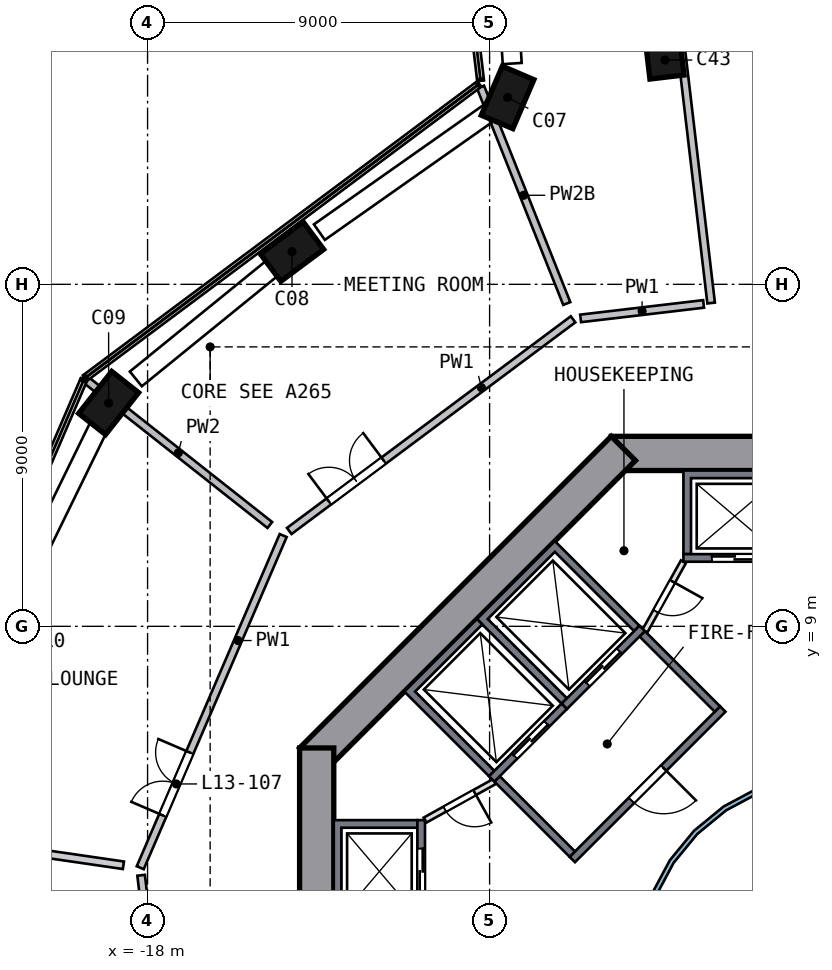
"""IFC4 building model, lengths in metres.
Left out: names, types, materials, properties, quantities, classifications, styles, units other than length and angle.
Written with IfcOpenShell. Run it as: python <this file> out.ifc"""

import sys

from ifc_helpers import new_model, si_unit, direction, frame, frame_2d, origin, origin_2d, place, context, subcontext, project, spatial, polyline, rectangle, outline, extrude, element, fill, save


model = new_model("IFC4")
c1 = context("Model", 3, precision=1e-05, world=origin(), true_north=direction((0.0, 1.0)))
c2 = subcontext(c1, "Body", "Model", "MODEL_VIEW")
j1 = project(units=[si_unit("LENGTHUNIT", "METRE"), si_unit("PLANEANGLEUNIT", "RADIAN")], contexts=[c1])
p1 = place(None, origin())
s1 = spatial("IfcSite", under=j1, at=p1, CompositionType="ELEMENT")
p2 = place(p1, origin())
s2 = spatial("IfcBuilding", under=s1, at=p2, CompositionType="ELEMENT")
p3 = place(p2, frame((0.0, 0.0, 60.0)))
s3 = spatial("IfcBuildingStorey", under=s2, at=p3, CompositionType="ELEMENT", Elevation=60.0)
p4 = place(p3, frame((-8.424, 22.957, 0.0), z_axis=(-0.084837531, -0.031915624, 0.99588352), x_axis=(0.390902536, 0.918292025, 0.062729293)))
e1 = element("IfcColumn", 1, at=p4, inside=s3, PredefinedType="COLUMN", context=c2, shape_type="SweptSolid", body=[
    extrude(rectangle(XDim=1.4, YDim=0.9, at=origin_2d()), origin(), (0.0, 0.0, 1.0), 4.207),
])
p5 = place(p3, frame((-14.115, 18.924, 0.0), z_axis=(-0.069769341, -0.052936472, 0.996157602), x_axis=(-0.798641913, -0.595400375, -0.087575616)))
e2 = element("IfcColumn", 2, at=p5, inside=s3, PredefinedType="COLUMN", context=c2, shape_type="SweptSolid", body=[
    extrude(rectangle(XDim=1.4, YDim=0.9, at=origin_2d()), origin(), (0.0, 0.0, 1.0), 4.206),
])
p6 = place(p3, frame((-18.958, 14.962, 0.0), z_axis=(-0.054900108, -0.070801407, 0.995978483), x_axis=(0.616934701, 0.781898511, 0.089589582)))
e3 = element("IfcColumn", 3, at=p6, inside=s3, PredefinedType="COLUMN", context=c2, shape_type="SweptSolid", body=[
    extrude(rectangle(XDim=1.4, YDim=0.9, at=origin_2d()), origin(), (0.0, 0.0, 1.0), 4.207),
])
p7 = place(p3, frame((-4.279, 23.922, 0.0), z_axis=(-0.088555658, -0.016654963, 0.995931979), x_axis=(-0.118094059, 0.992983646, 0.006105044)))
e4 = element("IfcColumn", 4, at=p7, inside=s3, PredefinedType="COLUMN", context=c2, shape_type="SweptSolid", body=[
    extrude(rectangle(XDim=0.9, YDim=0.9, at=origin_2d()), origin(), (0.0, 0.0, 1.0), 4.207),
])
p8 = place(p3, frame((5.799, 13.55, 0.0), z_axis=(0.0, 0.0, 1.0), x_axis=(-1.0, 0.0, 0.0)))
e5 = element("IfcWall", 5, at=p8, inside=s3, PredefinedType="SHEAR", context=c2, shape_type="SweptSolid", body=[
    extrude(rectangle(XDim=11.598, YDim=0.9, at=frame_2d((5.799, 0.0))), origin(), (0.0, 0.0, 1.0), 4.5),
])
p9 = place(p8, frame((4.899, 0.0, 0.0)))
e6 = element("IfcOpeningElement", 6, at=p9, cuts=e5, PredefinedType="OPENING", context=c2, shape_type="SweptSolid", body=[
    extrude(rectangle(XDim=1.8, YDim=2.1, at=frame_2d((0.9, 1.05))), frame((0.0, 0.46, 0.0), z_axis=(0.0, -1.0, 0.0), x_axis=(1.0, 0.0, 0.0)), (0.0, 0.0, 1.0), 0.92),
])
p10 = place(p3, frame((-5.481, 13.682, 0.0), z_axis=(0.0, 0.0, 1.0), x_axis=(-0.707106781, -0.707106781, 0.0)))
e7 = element("IfcWall", 7, at=p10, inside=s3, PredefinedType="SHEAR", context=c2, shape_type="SweptSolid", body=[
    extrude(rectangle(XDim=11.598, YDim=0.9, at=frame_2d((5.799, 0.0))), origin(), (0.0, 0.0, 1.0), 4.5),
])
p11 = place(p3, frame((-13.55, 5.799, 0.0), z_axis=(0.0, 0.0, 1.0), x_axis=(0.0, -1.0, 0.0)))
e8 = element("IfcWall", 8, at=p11, inside=s3, PredefinedType="SHEAR", context=c2, shape_type="SweptSolid", body=[
    extrude(rectangle(XDim=11.598, YDim=0.9, at=frame_2d((5.799, 0.0))), origin(), (0.0, 0.0, 1.0), 4.5),
])
p12 = place(p11, frame((4.899, 0.0, 0.0)))
e9 = element("IfcOpeningElement", 9, at=p12, cuts=e8, PredefinedType="OPENING", context=c2, shape_type="SweptSolid", body=[
    extrude(rectangle(XDim=1.8, YDim=2.1, at=frame_2d((0.9, 1.05))), frame((0.0, 0.46, 0.0), z_axis=(0.0, -1.0, 0.0), x_axis=(1.0, 0.0, 0.0)), (0.0, 0.0, 1.0), 0.92),
])
p13 = place(p3, origin())
e10 = element("IfcWall", 10, at=p13, inside=s3, PredefinedType="SOLIDWALL", context=c2, shape_type="SweptSolid", body=[
    extrude(outline(polyline([(-3.9, 10.9), (-3.9, 13.1), (-1.2, 13.1), (-1.2, 10.9), (-1.4, 10.9), (-1.4, 12.9), (-3.7, 12.9), (-3.7, 10.9), (-3.9, 10.9)])), origin(), (0.0, 0.0, 1.0), 4.19),
])
p14 = place(p3, frame((-1.2, 10.8, 0.0), z_axis=(0.0, 0.0, 1.0), x_axis=(-1.0, 0.0, 0.0)))
e11 = element("IfcWall", 11, at=p14, inside=s3, PredefinedType="SOLIDWALL", context=c2, shape_type="SweptSolid", body=[
    extrude(rectangle(XDim=2.7, YDim=0.2, at=frame_2d((1.35, 0.0))), origin(), (0.0, 0.0, 1.0), 4.19),
])
p15 = place(p14, frame((0.75, 0.0, 0.0)))
e12 = element("IfcOpeningElement", 12, at=p15, cuts=e11, PredefinedType="OPENING", context=c2, shape_type="SweptSolid", body=[
    extrude(rectangle(XDim=1.2, YDim=2.1, at=frame_2d((0.6, 1.05))), frame((0.0, 0.11, 0.0), z_axis=(0.0, -1.0, 0.0), x_axis=(1.0, 0.0, 0.0)), (0.0, 0.0, 1.0), 0.22),
])
p16 = place(p3, origin())
e13 = element("IfcWall", 13, at=p16, inside=s3, PredefinedType="SOLIDWALL", context=c2, shape_type="SweptSolid", body=[
    extrude(outline(polyline([(-13.1, 3.9), (-10.9, 3.9), (-10.9, 3.7), (-12.9, 3.7), (-12.9, 1.4), (-10.9, 1.4), (-10.9, 1.2), (-13.1, 1.2), (-13.1, 3.9)])), origin(), (0.0, 0.0, 1.0), 4.19),
])
p17 = place(p3, frame((-10.8, 1.2, 0.0), z_axis=(0.0, 0.0, 1.0), x_axis=(0.0, 1.0, 0.0)))
e14 = element("IfcWall", 14, at=p17, inside=s3, PredefinedType="SOLIDWALL", context=c2, shape_type="SweptSolid", body=[
    extrude(rectangle(XDim=2.7, YDim=0.2, at=frame_2d((1.35, 0.0))), origin(), (0.0, 0.0, 1.0), 4.19),
])
p18 = place(p17, frame((0.75, 0.0, 0.0)))
e15 = element("IfcOpeningElement", 15, at=p18, cuts=e14, PredefinedType="OPENING", context=c2, shape_type="SweptSolid", body=[
    extrude(rectangle(XDim=1.2, YDim=2.1, at=frame_2d((0.6, 1.05))), frame((0.0, 0.11, 0.0), z_axis=(0.0, -1.0, 0.0), x_axis=(1.0, 0.0, 0.0)), (0.0, 0.0, 1.0), 0.22),
])
p19 = place(p3, origin())
e16 = element("IfcWall", 16, at=p19, inside=s3, PredefinedType="SOLIDWALL", context=c2, shape_type="SweptSolid", body=[
    extrude(outline(polyline([(-9.334, 9.192), (-7.283, 11.243), (-5.056, 9.016), (-5.197, 8.874), (-7.283, 10.96), (-9.051, 9.192), (-6.965, 7.106), (-7.106, 6.965), (-9.334, 9.192)])), origin(), (0.0, 0.0, 1.0), 4.19),
])
p20 = place(p3, frame((-4.985, 8.945, 0.0), z_axis=(0.0, 0.0, 1.0), x_axis=(-0.707106781, -0.707106781, 0.0)))
e17 = element("IfcWall", 17, at=p20, inside=s3, PredefinedType="SOLIDWALL", context=c2, shape_type="SweptSolid", body=[
    extrude(rectangle(XDim=2.9, YDim=0.2, at=frame_2d((1.45, 0.0))), origin(), (0.0, 0.0, 1.0), 4.19),
])
p21 = place(p20, frame((0.85, 0.0, 0.0)))
e18 = element("IfcOpeningElement", 18, at=p21, cuts=e17, PredefinedType="OPENING", context=c2, shape_type="SweptSolid", body=[
    extrude(rectangle(XDim=1.2, YDim=2.1, at=frame_2d((0.6, 1.05))), frame((0.0, 0.11, 0.0), z_axis=(0.0, -1.0, 0.0), x_axis=(1.0, 0.0, 0.0)), (0.0, 0.0, 1.0), 0.22),
])
p22 = place(p3, origin())
e19 = element("IfcWall", 19, at=p22, inside=s3, PredefinedType="SOLIDWALL", context=c2, shape_type="SweptSolid", body=[
    extrude(outline(polyline([(-11.243, 7.283), (-9.334, 9.192), (-9.192, 9.051), (-10.96, 7.283), (-8.874, 5.197), (-9.016, 5.056), (-11.243, 7.283)])), origin(), (0.0, 0.0, 1.0), 4.19),
])
p23 = place(p3, frame((-7.036, 6.894, 0.0), z_axis=(0.0, 0.0, 1.0), x_axis=(-0.707106781, -0.707106781, 0.0)))
e20 = element("IfcWall", 20, at=p23, inside=s3, PredefinedType="SOLIDWALL", context=c2, shape_type="SweptSolid", body=[
    extrude(rectangle(XDim=2.7, YDim=0.2, at=frame_2d((1.35, 0.0))), origin(), (0.0, 0.0, 1.0), 4.19),
])
p24 = place(p23, frame((0.65, 0.0, 0.0)))
e21 = element("IfcOpeningElement", 21, at=p24, cuts=e20, PredefinedType="OPENING", context=c2, shape_type="SweptSolid", body=[
    extrude(rectangle(XDim=1.2, YDim=2.1, at=frame_2d((0.6, 1.05))), frame((0.0, 0.11, 0.0), z_axis=(0.0, -1.0, 0.0), x_axis=(1.0, 0.0, 0.0)), (0.0, 0.0, 1.0), 0.22),
])
p25 = place(p3, frame((-2.864, 6.823, 0.0), z_axis=(0.0, 0.0, 1.0), x_axis=(-0.707106781, -0.707106781, 0.0)))
e22 = element("IfcWall", 22, at=p25, inside=s3, PredefinedType="SOLIDWALL", context=c2, shape_type="SweptSolid", body=[
    extrude(rectangle(XDim=5.6, YDim=0.2, at=frame_2d((2.8, 0.0))), origin(), (0.0, 0.0, 1.0), 4.19),
])
p26 = place(p25, frame((2.2, 0.0, 0.0)))
e23 = element("IfcOpeningElement", 23, at=p26, cuts=e22, PredefinedType="OPENING", context=c2, shape_type="SweptSolid", body=[
    extrude(rectangle(XDim=1.2, YDim=2.1, at=frame_2d((0.6, 1.05))), frame((0.0, 0.11, 0.0), z_axis=(0.0, -1.0, 0.0), x_axis=(1.0, 0.0, 0.0)), (0.0, 0.0, 1.0), 0.22),
])
for number, where, z_axis, x_axis in (
    (24, (-3.005, 6.823, 0.0), (0.0, 0.0, 1.0), (-0.707, 0.707, 0.0)),
    (25, (-6.823, 3.005, 0.0), (0.0, 0.0, 1.0), (-0.707, 0.707, 0.0)),
):
    element("IfcWall", number, at=place(p3, frame(where, z_axis=z_axis, x_axis=x_axis)), inside=s3, PredefinedType="SOLIDWALL", context=c2, shape_type="SweptSolid", body=[
        extrude(rectangle(XDim=2.8, YDim=0.2, at=frame_2d((1.4, 0.0))), origin(), (0.0, 0.0, 1.0), 4.19),
    ])
p27 = place(p3, frame((-3.9, 10.7, 0.0), z_axis=(0.0, 0.0, 1.0), x_axis=(-0.485692555, -0.874129705, 0.0)))
e26 = element("IfcWall", 26, at=p27, inside=s3, PredefinedType="PARTITIONING", context=c2, shape_type="SweptSolid", body=[
    extrude(rectangle(XDim=2.089, YDim=0.15, at=frame_2d((1.044, 0.0))), origin(), (0.0, 0.0, 1.0), 4.19),
])
p28 = place(p27, frame((0.594, 0.0, 0.0)))
e27 = element("IfcOpeningElement", 27, at=p28, cuts=e26, PredefinedType="OPENING", context=c2, shape_type="SweptSolid", body=[
    extrude(rectangle(XDim=0.9, YDim=2.1, at=frame_2d((0.45, 1.05))), frame((0.0, 0.085, 0.0), z_axis=(0.0, -1.0, 0.0), x_axis=(1.0, 0.0, 0.0)), (0.0, 0.0, 1.0), 0.17),
])
p29 = place(p3, frame((-8.874, 4.914, 0.0), z_axis=(0.0, 0.0, 1.0), x_axis=(-0.874129705, -0.485692555, 0.0)))
e28 = element("IfcWall", 28, at=p29, inside=s3, PredefinedType="PARTITIONING", context=c2, shape_type="SweptSolid", body=[
    extrude(rectangle(XDim=2.089, YDim=0.15, at=frame_2d((1.044, 0.0))), origin(), (0.0, 0.0, 1.0), 4.19),
])
p30 = place(p29, frame((0.594, 0.0, 0.0)))
e29 = element("IfcOpeningElement", 29, at=p30, cuts=e28, PredefinedType="OPENING", context=c2, shape_type="SweptSolid", body=[
    extrude(rectangle(XDim=0.9, YDim=2.1, at=frame_2d((0.45, 1.05))), frame((0.0, 0.085, 0.0), z_axis=(0.0, -1.0, 0.0), x_axis=(1.0, 0.0, 0.0)), (0.0, 0.0, 1.0), 0.17),
])
p31 = place(p3, origin())
e30 = element("IfcWall", 30, at=p31, inside=s3, PredefinedType="SOLIDWALL", context=c2, shape_type="SweptSolid", body=[
    extrude(outline(polyline([(5.021, -0.999), (4.73, -1.959), (4.257, -2.844), (3.62, -3.62), (2.844, -4.257), (1.959, -4.73), (0.999, -5.021), (0.0, -5.12), (-0.999, -5.021), (-1.959, -4.73), (-2.844, -4.257), (-3.62, -3.62), (-4.257, -2.844), (-4.73, -1.959), (-5.021, -0.999), (-5.12, 0.0), (-5.021, 0.999), (-4.73, 1.959), (-4.257, 2.844), (-3.62, 3.62), (-2.844, 4.257), (-1.959, 4.73), (-0.999, 5.021), (0.0, 5.12), (0.999, 5.021), (1.959, 4.73), (2.844, 4.257), (3.62, 3.62), (4.257, 2.844), (4.73, 1.959), (5.021, 0.999), (5.12, 0.0), (5.021, -0.999)]), holes=[polyline([(4.904, 0.976), (4.619, 1.913), (4.157, 2.778), (3.535, 3.535), (2.778, 4.157), (1.913, 4.619), (0.976, 4.904), (0.0, 5.0), (-0.976, 4.904), (-1.913, 4.619), (-2.778, 4.157), (-3.535, 3.535), (-4.157, 2.778), (-4.619, 1.913), (-4.904, 0.976), (-5.0, 0.0), (-4.904, -0.976), (-4.619, -1.913), (-4.157, -2.778), (-3.535, -3.535), (-2.778, -4.157), (-1.913, -4.619), (-0.976, -4.904), (0.0, -5.0), (0.976, -4.904), (1.913, -4.619), (2.778, -4.157), (3.535, -3.535), (4.157, -2.778), (4.619, -1.913), (4.904, -0.976), (5.0, 0.0), (4.904, 0.976)])]), origin(), (0.0, 0.0, 1.0), 4.19),
])
p32 = place(p3, frame((-17.103, -6.605, 0.0), z_axis=(0.0, 0.0, 1.0), x_axis=(-0.117027699, 0.993128651, 0.0)))
e31 = element("IfcWall", 31, at=p32, inside=s3, PredefinedType="SOLIDWALL", context=c2, shape_type="SweptSolid", body=[
    extrude(rectangle(XDim=9.117, YDim=0.2, at=frame_2d((4.558, 0.0))), origin(), (0.0, 0.0, 1.0), 4.19),
])
p33 = place(p32, frame((6.508, 0.0, 0.0)))
e32 = element("IfcOpeningElement", 32, at=p33, cuts=e31, PredefinedType="OPENING", context=c2, shape_type="SweptSolid", body=[
    extrude(rectangle(XDim=0.9, YDim=2.1, at=frame_2d((0.45, 1.05))), frame((0.0, 0.11, 0.0), z_axis=(0.0, -1.0, 0.0), x_axis=(1.0, 0.0, 0.0)), (0.0, 0.0, 1.0), 0.22),
])
p34 = place(p32, frame((2.508, 0.0, 0.0)))
e33 = element("IfcOpeningElement", 33, at=p34, cuts=e31, PredefinedType="OPENING", context=c2, shape_type="SweptSolid", body=[
    extrude(rectangle(XDim=0.9, YDim=2.1, at=frame_2d((0.45, 1.05))), frame((0.0, 0.11, 0.0), z_axis=(0.0, -1.0, 0.0), x_axis=(1.0, 0.0, 0.0)), (0.0, 0.0, 1.0), 0.22),
])
p35 = place(p32, frame((0.2, 0.0, 0.0)))
e34 = element("IfcOpeningElement", 34, at=p35, cuts=e31, PredefinedType="OPENING", context=c2, shape_type="SweptSolid", body=[
    extrude(rectangle(XDim=0.9, YDim=2.1, at=frame_2d((0.45, 1.05))), frame((0.0, 0.11, 0.0), z_axis=(0.0, -1.0, 0.0), x_axis=(1.0, 0.0, 0.0)), (0.0, 0.0, 1.0), 0.22),
])
p36 = place(p3, frame((-18.193, 2.648, 0.0), z_axis=(0.0, 0.0, 1.0), x_axis=(0.395231694, 0.918581465, 0.0)))
e35 = element("IfcWall", 35, at=p36, inside=s3, PredefinedType="SOLIDWALL", context=c2, shape_type="SweptSolid", body=[
    extrude(rectangle(XDim=9.517, YDim=0.2, at=frame_2d((4.758, 0.0))), origin(), (0.0, 0.0, 1.0), 4.19),
])
p37 = place(p36, frame((1.5, 0.0, 0.0)))
e36 = element("IfcOpeningElement", 36, at=p37, cuts=e35, PredefinedType="OPENING", context=c2, shape_type="SweptSolid", body=[
    extrude(rectangle(XDim=1.8, YDim=2.1, at=frame_2d((0.9, 1.05))), frame((0.0, 0.11, 0.0), z_axis=(0.0, -1.0, 0.0), x_axis=(1.0, 0.0, 0.0)), (0.0, 0.0, 1.0), 0.22),
])
p38 = place(p3, frame((-14.271, 11.509, 0.0), z_axis=(0.0, 0.0, 1.0), x_axis=(0.801557016, 0.597918348, 0.0)))
e37 = element("IfcWall", 37, at=p38, inside=s3, PredefinedType="SOLIDWALL", context=c2, shape_type="SweptSolid", body=[
    extrude(rectangle(XDim=9.317, YDim=0.2, at=frame_2d((4.658, 0.0))), origin(), (0.0, 0.0, 1.0), 4.19),
])
p39 = place(p38, frame((1.3, 0.0, 0.0)))
e38 = element("IfcOpeningElement", 38, at=p39, cuts=e37, PredefinedType="OPENING", context=c2, shape_type="SweptSolid", body=[
    extrude(rectangle(XDim=1.8, YDim=2.1, at=frame_2d((0.9, 1.05))), frame((0.0, 0.11, 0.0), z_axis=(0.0, -1.0, 0.0), x_axis=(1.0, 0.0, 0.0)), (0.0, 0.0, 1.0), 0.22),
])
p40 = place(p3, frame((-3.369, 17.484, 0.0), z_axis=(0.0, 0.0, 1.0), x_axis=(-0.993127057, -0.11704123, 0.0)))
e39 = element("IfcWall", 39, at=p40, inside=s3, PredefinedType="SOLIDWALL", context=c2, shape_type="SweptSolid", body=[
    extrude(rectangle(XDim=3.258, YDim=0.2, at=frame_2d((1.629, 0.0))), origin(), (0.0, 0.0, 1.0), 4.19),
])
p41 = place(p3, frame((-3.17, 17.508, 0.0), z_axis=(0.0, 0.0, 1.0), x_axis=(-0.117027895, 0.993128628, 0.0)))
e40 = element("IfcWall", 40, at=p41, inside=s3, PredefinedType="SOLIDWALL", context=c2, shape_type="SweptSolid", body=[
    extrude(rectangle(XDim=22.464, YDim=0.2, at=frame_2d((11.232, 0.0))), origin(), (0.0, 0.0, 1.0), 4.19),
])
p42 = place(p41, frame((18.894, 0.0, 0.0)))
e41 = element("IfcOpeningElement", 41, at=p42, cuts=e40, PredefinedType="OPENING", context=c2, shape_type="SweptSolid", body=[
    extrude(rectangle(XDim=1.8, YDim=2.1, at=frame_2d((0.9, 1.05))), frame((0.0, 0.11, 0.0), z_axis=(0.0, -1.0, 0.0), x_axis=(1.0, 0.0, 0.0)), (0.0, 0.0, 1.0), 0.22),
])
p43 = place(p41, frame((12.5, 0.0, 0.0)))
e42 = element("IfcOpeningElement", 42, at=p43, cuts=e40, PredefinedType="OPENING", context=c2, shape_type="SweptSolid", body=[
    extrude(rectangle(XDim=1.0, YDim=2.1, at=frame_2d((0.5, 1.05))), frame((0.0, 0.11, 0.0), z_axis=(0.0, -1.0, 0.0), x_axis=(1.0, 0.0, 0.0)), (0.0, 0.0, 1.0), 0.22),
])
p44 = place(p3, frame((-3.615, 40.077, 0.0), z_axis=(0.0, 0.0, 1.0), x_axis=(0.117014285, -0.993130232, 0.0)))
e43 = element("IfcWall", 43, at=p44, inside=s3, PredefinedType="SOLIDWALL", context=c2, shape_type="SweptSolid", body=[
    extrude(rectangle(XDim=22.266, YDim=0.2, at=frame_2d((11.133, 0.0))), origin(), (0.0, 0.0, 1.0), 4.19),
])
p45 = place(p44, frame((14.4, 0.0, 0.0)))
e44 = element("IfcOpeningElement", 44, at=p45, cuts=e43, PredefinedType="OPENING", context=c2, shape_type="SweptSolid", body=[
    extrude(rectangle(XDim=1.0, YDim=2.1, at=frame_2d((0.5, 1.05))), frame((0.0, 0.11, 0.0), z_axis=(0.0, -1.0, 0.0), x_axis=(1.0, 0.0, 0.0)), (0.0, 0.0, 1.0), 0.22),
])
p46 = place(p3, frame((-14.783, 11.667, 0.0), z_axis=(0.0, 0.0, 1.0), x_axis=(-0.78499995, 0.619495827, 0.0)))
e45 = element("IfcWall", 45, at=p46, inside=s3, PredefinedType="SOLIDWALL", context=c2, shape_type="SweptSolid", body=[
    extrude(rectangle(XDim=6.132, YDim=0.2, at=frame_2d((3.066, 0.0))), origin(), (0.0, 0.0, 1.0), 4.19),
])
p47 = place(p3, frame((-9.239, 23.192, 0.0), z_axis=(0.0, 0.0, 1.0), x_axis=(0.370079161, -0.929000223, 0.0)))
e46 = element("IfcWall", 46, at=p47, inside=s3, PredefinedType="SOLIDWALL", context=c2, shape_type="SweptSolid", body=[
    extrude(rectangle(XDim=6.132, YDim=0.2, at=frame_2d((3.066, 0.0))), origin(), (0.0, 0.0, 1.0), 3.69),
])
p48 = place(p3, frame((-18.636, 2.712, 0.0), z_axis=(0.0, 0.0, 1.0), x_axis=(-0.989570967, 0.144046178, 0.0)))
e47 = element("IfcWall", 47, at=p48, inside=s3, PredefinedType="SOLIDWALL", context=c2, shape_type="SweptSolid", body=[
    extrude(rectangle(XDim=6.132, YDim=0.2, at=frame_2d((3.066, 0.0))), origin(), (0.0, 0.0, 1.0), 4.19),
])
p49 = place(p15, origin())
e48 = element("IfcDoor", 48, at=p49, inside=s3, OperationType="DOUBLE_DOOR_SLIDING", PredefinedType="DOOR", context=c2, shape_type="SweptSolid", body=[
    extrude(rectangle(XDim=1.2, YDim=2.1, at=frame_2d((0.6, 1.05))), frame((0.0, 0.025, 0.0), z_axis=(0.0, -1.0, 0.0), x_axis=(1.0, 0.0, 0.0)), (0.0, 0.0, 1.0), 0.05),
])
fill(e12, e48)
p50 = place(p18, origin())
e49 = element("IfcDoor", 49, at=p50, inside=s3, OperationType="DOUBLE_DOOR_SLIDING", PredefinedType="DOOR", context=c2, shape_type="SweptSolid", body=[
    extrude(rectangle(XDim=1.2, YDim=2.1, at=frame_2d((0.6, 1.05))), frame((0.0, 0.025, 0.0), z_axis=(0.0, -1.0, 0.0), x_axis=(1.0, 0.0, 0.0)), (0.0, 0.0, 1.0), 0.05),
])
fill(e15, e49)
p51 = place(p21, origin())
e50 = element("IfcDoor", 50, at=p51, inside=s3, OperationType="DOUBLE_DOOR_SLIDING", PredefinedType="DOOR", context=c2, shape_type="SweptSolid", body=[
    extrude(rectangle(XDim=1.2, YDim=2.1, at=frame_2d((0.6, 1.05))), frame((0.0, 0.025, 0.0), z_axis=(0.0, -1.0, 0.0), x_axis=(1.0, 0.0, 0.0)), (0.0, 0.0, 1.0), 0.05),
])
fill(e18, e50)
p52 = place(p24, origin())
e51 = element("IfcDoor", 51, at=p52, inside=s3, OperationType="DOUBLE_DOOR_SLIDING", PredefinedType="DOOR", context=c2, shape_type="SweptSolid", body=[
    extrude(rectangle(XDim=1.2, YDim=2.1, at=frame_2d((0.6, 1.05))), frame((0.0, 0.025, 0.0), z_axis=(0.0, -1.0, 0.0), x_axis=(1.0, 0.0, 0.0)), (0.0, 0.0, 1.0), 0.05),
])
fill(e21, e51)
p53 = place(p26, origin())
e52 = element("IfcDoor", 52, at=p53, inside=s3, OperationType="SINGLE_SWING_LEFT", PredefinedType="DOOR", context=c2, shape_type="SweptSolid", body=[
    extrude(rectangle(XDim=1.2, YDim=2.1, at=frame_2d((0.6, 1.05))), frame((0.0, 0.025, 0.0), z_axis=(0.0, -1.0, 0.0), x_axis=(1.0, 0.0, 0.0)), (0.0, 0.0, 1.0), 0.05),
])
fill(e23, e52)
p54 = place(p28, origin())
e53 = element("IfcDoor", 53, at=p54, inside=s3, OperationType="SINGLE_SWING_LEFT", PredefinedType="DOOR", context=c2, shape_type="SweptSolid", body=[
    extrude(rectangle(XDim=0.9, YDim=2.1, at=frame_2d((0.45, 1.05))), frame((0.0, 0.025, 0.0), z_axis=(0.0, -1.0, 0.0), x_axis=(1.0, 0.0, 0.0)), (0.0, 0.0, 1.0), 0.05),
])
fill(e27, e53)
p55 = place(p30, origin())
e54 = element("IfcDoor", 54, at=p55, inside=s3, OperationType="SINGLE_SWING_LEFT", PredefinedType="DOOR", context=c2, shape_type="SweptSolid", body=[
    extrude(rectangle(XDim=0.9, YDim=2.1, at=frame_2d((0.45, 1.05))), frame((0.0, 0.025, 0.0), z_axis=(0.0, -1.0, 0.0), x_axis=(1.0, 0.0, 0.0)), (0.0, 0.0, 1.0), 0.05),
])
fill(e29, e54)
p56 = place(p39, origin())
e55 = element("IfcDoor", 55, at=p56, inside=s3, OperationType="DOUBLE_DOOR_SINGLE_SWING", PredefinedType="DOOR", context=c2, shape_type="SweptSolid", body=[
    extrude(rectangle(XDim=1.8, YDim=2.1, at=frame_2d((0.9, 1.05))), frame((0.0, 0.025, 0.0), z_axis=(0.0, -1.0, 0.0), x_axis=(1.0, 0.0, 0.0)), (0.0, 0.0, 1.0), 0.05),
])
fill(e38, e55)
p57 = place(p37, origin())
e56 = element("IfcDoor", 56, at=p57, inside=s3, OperationType="DOUBLE_DOOR_SINGLE_SWING", PredefinedType="DOOR", context=c2, shape_type="SweptSolid", body=[
    extrude(rectangle(XDim=1.8, YDim=2.1, at=frame_2d((0.9, 1.05))), frame((0.0, 0.025, 0.0), z_axis=(0.0, -1.0, 0.0), x_axis=(1.0, 0.0, 0.0)), (0.0, 0.0, 1.0), 0.05),
])
fill(e36, e56)
save(model, sys.argv[1])
